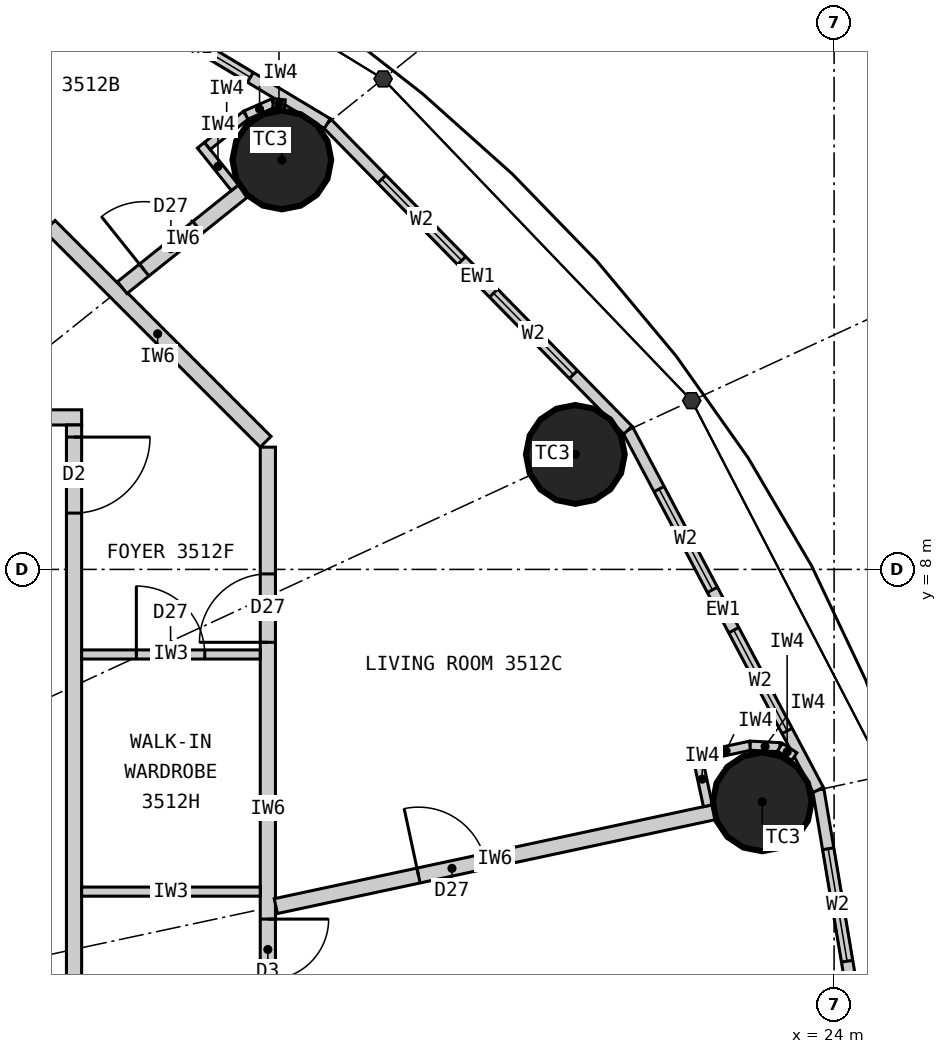
"""IFC4 building model, lengths in metres.
Left out: names, types, materials, properties, quantities, classifications, styles, units other than length and angle.
Written with IfcOpenShell. Run it as: python <this file> out.ifc"""

import sys

from ifc_helpers import new_model, si_unit, direction, frame, frame_2d, origin, origin_2d, place, context, subcontext, project, spatial, rectangle, circle, extrude, clip, halfspace, element, fill, save


model = new_model("IFC4")
c1 = context("Model", 3, precision=1e-05, world=origin(), true_north=direction((0.0, 1.0)))
c2 = subcontext(c1, "Body", "Model", "MODEL_VIEW")
j1 = project(units=[si_unit("LENGTHUNIT", "METRE"), si_unit("PLANEANGLEUNIT", "RADIAN")], contexts=[c1])
p1 = place(None, origin())
s1 = spatial("IfcSite", under=j1, at=p1, CompositionType="ELEMENT")
p2 = place(p1, origin())
s2 = spatial("IfcBuilding", under=s1, at=p2, CompositionType="ELEMENT")
p3 = place(p2, frame((0.0, 0.0, 135.3)))
s3 = spatial("IfcBuildingStorey", under=s2, at=p3, CompositionType="ELEMENT", Elevation=135.3)
for number, where, z_axis, x_axis in (
    (1, (23.055, 4.942, 0.0), (0.0, 0.0, 1.0), (1.0, 0.0, 0.0)),
    (2, (20.596, 9.513, 0.0), (0.0, 0.0, 1.0), (1.0, 0.0, 0.0)),
    (3, (16.734, 13.387, 0.0), (0.0, 0.0, 1.0), (1.0, 0.0, 0.0)),
):
    element("IfcColumn", number, at=place(p3, frame(where, z_axis=z_axis, x_axis=x_axis)), inside=s3, PredefinedType="COLUMN", context=c2, shape_type="Clipping", body=[
        clip(extrude(circle(Radius=0.65, at=origin_2d()), origin(), (0.0, 0.0, 1.0), 3.3), halfspace(frame((0.0, 0.0, 2.25), z_axis=(0.0, 0.0, 1.0), x_axis=(1.0, 0.0, 0.0)), False)),
    ])
p4 = place(p3, frame((24.65, 0.0, 0.0), z_axis=(0.0, 0.0, 1.0), x_axis=(-0.165883894218, 0.986145290329, 0.0)))
e4 = element("IfcWall", 4, at=p4, inside=s3, PredefinedType="ELEMENTEDWALL", context=c2, shape_type="SweptSolid", body=[
    extrude(rectangle(XDim=5.172, YDim=0.15, at=frame_2d((2.586, 0.0))), origin(), (0.0, 0.0, 1.0), 3.05),
])
p5 = place(p4, frame((0.786, 0.0, 0.9)))
e5 = element("IfcOpeningElement", 5, at=p5, cuts=e4, PredefinedType="OPENING", context=c2, shape_type="SweptSolid", body=[
    extrude(rectangle(XDim=1.5, YDim=1.9, at=frame_2d((0.75, 0.95))), frame((0.0, 0.085, 0.0), z_axis=(0.0, -1.0, 0.0), x_axis=(1.0, 0.0, 0.0)), (0.0, 0.0, 1.0), 0.17),
])
p6 = place(p4, frame((2.886, 0.0, 0.9)))
e6 = element("IfcOpeningElement", 6, at=p6, cuts=e4, PredefinedType="OPENING", context=c2, shape_type="SweptSolid", body=[
    extrude(rectangle(XDim=1.5, YDim=1.9, at=frame_2d((0.75, 0.95))), frame((0.0, 0.085, 0.0), z_axis=(0.0, -1.0, 0.0), x_axis=(1.0, 0.0, 0.0)), (0.0, 0.0, 1.0), 0.17),
])
p7 = place(p3, frame((23.792, 5.1, 0.0), z_axis=(0.0, 0.0, 1.0), x_axis=(-0.467814388454, 0.883826735257, 0.0)))
e7 = element("IfcWall", 7, at=p7, inside=s3, PredefinedType="ELEMENTEDWALL", context=c2, shape_type="SweptSolid", body=[
    extrude(rectangle(XDim=5.354, YDim=0.15, at=frame_2d((2.677, 0.0))), origin(), (0.0, 0.0, 1.0), 3.05),
])
p8 = place(p7, frame((0.877, 0.0, 0.9)))
e8 = element("IfcOpeningElement", 8, at=p8, cuts=e7, PredefinedType="OPENING", context=c2, shape_type="SweptSolid", body=[
    extrude(rectangle(XDim=1.5, YDim=1.9, at=frame_2d((0.75, 0.95))), frame((0.0, 0.085, 0.0), z_axis=(0.0, -1.0, 0.0), x_axis=(1.0, 0.0, 0.0)), (0.0, 0.0, 1.0), 0.17),
])
p9 = place(p7, frame((2.977, 0.0, 0.9)))
e9 = element("IfcOpeningElement", 9, at=p9, cuts=e7, PredefinedType="OPENING", context=c2, shape_type="SweptSolid", body=[
    extrude(rectangle(XDim=1.5, YDim=1.9, at=frame_2d((0.75, 0.95))), frame((0.0, 0.085, 0.0), z_axis=(0.0, -1.0, 0.0), x_axis=(1.0, 0.0, 0.0)), (0.0, 0.0, 1.0), 0.17),
])
p10 = place(p3, frame((21.287, 9.832, 0.0), z_axis=(0.0, 0.0, 1.0), x_axis=(-0.700136650834, 0.714008872605, 0.0)))
e10 = element("IfcWall", 10, at=p10, inside=s3, PredefinedType="ELEMENTEDWALL", context=c2, shape_type="SweptSolid", body=[
    extrude(rectangle(XDim=5.649, YDim=0.15, at=frame_2d((2.825, 0.0))), origin(), (0.0, 0.0, 1.0), 3.05),
])
p11 = place(p10, frame((1.025, 0.0, 0.9)))
e11 = element("IfcOpeningElement", 11, at=p11, cuts=e10, PredefinedType="OPENING", context=c2, shape_type="SweptSolid", body=[
    extrude(rectangle(XDim=1.5, YDim=1.9, at=frame_2d((0.75, 0.95))), frame((0.0, 0.085, 0.0), z_axis=(0.0, -1.0, 0.0), x_axis=(1.0, 0.0, 0.0)), (0.0, 0.0, 1.0), 0.17),
])
p12 = place(p10, frame((3.125, 0.0, 0.9)))
e12 = element("IfcOpeningElement", 12, at=p12, cuts=e10, PredefinedType="OPENING", context=c2, shape_type="SweptSolid", body=[
    extrude(rectangle(XDim=1.5, YDim=1.9, at=frame_2d((0.75, 0.95))), frame((0.0, 0.085, 0.0), z_axis=(0.0, -1.0, 0.0), x_axis=(1.0, 0.0, 0.0)), (0.0, 0.0, 1.0), 0.17),
])
p13 = place(p3, frame((17.332, 13.866, 0.0), z_axis=(0.0, 0.0, 1.0), x_axis=(-0.857308573723, 0.514802884044, 0.0)))
e13 = element("IfcWall", 13, at=p13, inside=s3, PredefinedType="ELEMENTEDWALL", context=c2, shape_type="SweptSolid", body=[
    extrude(rectangle(XDim=5.961, YDim=0.15, at=frame_2d((2.98, 0.0))), origin(), (0.0, 0.0, 1.0), 3.05),
])
p14 = place(p13, frame((1.181, 0.0, 0.9)))
e14 = element("IfcOpeningElement", 14, at=p14, cuts=e13, PredefinedType="OPENING", context=c2, shape_type="SweptSolid", body=[
    extrude(rectangle(XDim=1.5, YDim=1.9, at=frame_2d((0.75, 0.95))), frame((0.0, 0.085, 0.0), z_axis=(0.0, -1.0, 0.0), x_axis=(1.0, 0.0, 0.0)), (0.0, 0.0, 1.0), 0.17),
])
p15 = place(p13, frame((3.281, 0.0, 0.9)))
e15 = element("IfcOpeningElement", 15, at=p15, cuts=e13, PredefinedType="OPENING", context=c2, shape_type="SweptSolid", body=[
    extrude(rectangle(XDim=1.5, YDim=1.9, at=frame_2d((0.75, 0.95))), frame((0.0, 0.085, 0.0), z_axis=(0.0, -1.0, 0.0), x_axis=(1.0, 0.0, 0.0)), (0.0, 0.0, 1.0), 0.17),
])
p16 = place(p3, frame((-14.1, 10.0, 0.0), z_axis=(0.0, 0.0, 1.0), x_axis=(1.0, 0.0, 0.0)))
e16 = element("IfcWall", 16, at=p16, inside=s3, PredefinedType="PARTITIONING", context=c2, shape_type="SweptSolid", body=[
    extrude(rectangle(XDim=28.2, YDim=0.2, at=frame_2d((14.1, 0.0))), origin(), (0.0, 0.0, 1.0), 3.05),
])
p17 = place(p16, frame((12.884, 0.0, 0.0)))
e17 = element("IfcOpeningElement", 17, at=p17, cuts=e16, PredefinedType="OPENING", context=c2, shape_type="SweptSolid", body=[
    extrude(rectangle(XDim=1.0, YDim=2.2, at=frame_2d((0.5, 1.1))), frame((0.0, 0.11, 0.0), z_axis=(0.0, -1.0, 0.0), x_axis=(1.0, 0.0, 0.0)), (0.0, 0.0, 1.0), 0.22),
])
p18 = place(p16, frame((8.164, 0.0, 0.0)))
e18 = element("IfcOpeningElement", 18, at=p18, cuts=e16, PredefinedType="OPENING", context=c2, shape_type="SweptSolid", body=[
    extrude(rectangle(XDim=1.0, YDim=2.1, at=frame_2d((0.5, 1.05))), frame((0.0, 0.11, 0.0), z_axis=(0.0, -1.0, 0.0), x_axis=(1.0, 0.0, 0.0)), (0.0, 0.0, 1.0), 0.22),
])
p19 = place(p16, frame((3.591, 0.0, 0.0)))
e19 = element("IfcOpeningElement", 19, at=p19, cuts=e16, PredefinedType="OPENING", context=c2, shape_type="SweptSolid", body=[
    extrude(rectangle(XDim=1.0, YDim=2.2, at=frame_2d((0.5, 1.1))), frame((0.0, 0.11, 0.0), z_axis=(0.0, -1.0, 0.0), x_axis=(1.0, 0.0, 0.0)), (0.0, 0.0, 1.0), 0.22),
])
p20 = place(p16, frame((17.12, 0.0, 0.0)))
e20 = element("IfcOpeningElement", 20, at=p20, cuts=e16, PredefinedType="OPENING", context=c2, shape_type="SweptSolid", body=[
    extrude(rectangle(XDim=1.0, YDim=2.1, at=frame_2d((0.5, 1.05))), frame((0.0, 0.11, 0.0), z_axis=(0.0, -1.0, 0.0), x_axis=(1.0, 0.0, 0.0)), (0.0, 0.0, 1.0), 0.22),
])
p21 = place(p3, frame((14.0, -9.9, 0.0), z_axis=(0.0, 0.0, 1.0), x_axis=(0.0, 1.0, 0.0)))
e21 = element("IfcWall", 21, at=p21, inside=s3, PredefinedType="PARTITIONING", context=c2, shape_type="SweptSolid", body=[
    extrude(rectangle(XDim=19.8, YDim=0.2, at=frame_2d((9.9, 0.0))), origin(), (0.0, 0.0, 1.0), 3.05),
])
p22 = place(p21, frame((4.948, 0.0, 0.0)))
e22 = element("IfcOpeningElement", 22, at=p22, cuts=e21, PredefinedType="OPENING", context=c2, shape_type="SweptSolid", body=[
    extrude(rectangle(XDim=1.0, YDim=2.2, at=frame_2d((0.5, 1.1))), frame((0.0, 0.11, 0.0), z_axis=(0.0, -1.0, 0.0), x_axis=(1.0, 0.0, 0.0)), (0.0, 0.0, 1.0), 0.22),
])
p23 = place(p21, frame((18.641, 0.0, 0.0)))
e23 = element("IfcOpeningElement", 23, at=p23, cuts=e21, PredefinedType="OPENING", context=c2, shape_type="SweptSolid", body=[
    extrude(rectangle(XDim=1.0, YDim=2.2, at=frame_2d((0.5, 1.1))), frame((0.0, 0.11, 0.0), z_axis=(0.0, -1.0, 0.0), x_axis=(1.0, 0.0, 0.0)), (0.0, 0.0, 1.0), 0.22),
])
p24 = place(p3, frame((16.55, 0.101, 0.0), z_axis=(0.0, 0.0, 1.0), x_axis=(0.0, 1.0, 0.0)))
e24 = element("IfcWall", 24, at=p24, inside=s3, PredefinedType="PARTITIONING", context=c2, shape_type="SweptSolid", body=[
    extrude(rectangle(XDim=9.508, YDim=0.2, at=frame_2d((4.754, 0.0))), origin(), (0.0, 0.0, 1.0), 3.05),
])
p25 = place(p24, frame((2.499, 0.0, 0.0)))
e25 = element("IfcOpeningElement", 25, at=p25, cuts=e24, PredefinedType="OPENING", context=c2, shape_type="SweptSolid", body=[
    extrude(rectangle(XDim=0.8, YDim=2.1, at=frame_2d((0.4, 1.05))), frame((0.0, 0.11, 0.0), z_axis=(0.0, -1.0, 0.0), x_axis=(1.0, 0.0, 0.0)), (0.0, 0.0, 1.0), 0.22),
])
p26 = place(p24, frame((6.94, 0.0, 0.0)))
e26 = element("IfcOpeningElement", 26, at=p26, cuts=e24, PredefinedType="OPENING", context=c2, shape_type="SweptSolid", body=[
    extrude(rectangle(XDim=0.9, YDim=2.1, at=frame_2d((0.45, 1.05))), frame((0.0, 0.11, 0.0), z_axis=(0.0, -1.0, 0.0), x_axis=(1.0, 0.0, 0.0)), (0.0, 0.0, 1.0), 0.22),
])
p27 = place(p3, frame((16.521, 9.679, 0.0), z_axis=(0.0, 0.0, 1.0), x_axis=(-0.707106781187, 0.707106781187, 0.0)))
e27 = element("IfcWall", 27, at=p27, inside=s3, PredefinedType="PARTITIONING", context=c2, shape_type="SweptSolid", body=[
    extrude(rectangle(XDim=4.019, YDim=0.2, at=frame_2d((2.009, 0.0))), origin(), (0.0, 0.0, 1.0), 3.05),
])
p28 = place(p3, frame((16.655, 3.57, 0.0), z_axis=(0.0, 0.0, 1.0), x_axis=(0.977781197989, 0.209628072687, 0.0)))
e28 = element("IfcWall", 28, at=p28, inside=s3, PredefinedType="PARTITIONING", context=c2, shape_type="SweptSolid", body=[
    extrude(rectangle(XDim=5.896, YDim=0.2, at=frame_2d((2.948, 0.0))), origin(), (0.0, 0.0, 1.0), 2.15),
])
p29 = place(p28, frame((1.92, 0.0, 0.0)))
e29 = element("IfcOpeningElement", 29, at=p29, cuts=e28, PredefinedType="OPENING", context=c2, shape_type="SweptSolid", body=[
    extrude(rectangle(XDim=0.9, YDim=2.1, at=frame_2d((0.45, 1.05))), frame((0.0, 0.11, 0.0), z_axis=(0.0, -1.0, 0.0), x_axis=(1.0, 0.0, 0.0)), (0.0, 0.0, 1.0), 0.22),
])
p30 = place(p3, frame((14.634, 11.707, 0.0), z_axis=(0.0, 0.0, 1.0), x_axis=(0.780845447951, 0.6247242483, 0.0)))
e30 = element("IfcWall", 30, at=p30, inside=s3, PredefinedType="PARTITIONING", context=c2, shape_type="SweptSolid", body=[
    extrude(rectangle(XDim=2.039, YDim=0.2, at=frame_2d((1.02, 0.0))), origin(), (0.0, 0.0, 1.0), 2.15),
])
p31 = place(p30, frame((0.37, 0.0, 0.0)))
e31 = element("IfcOpeningElement", 31, at=p31, cuts=e30, PredefinedType="OPENING", context=c2, shape_type="SweptSolid", body=[
    extrude(rectangle(XDim=0.9, YDim=2.1, at=frame_2d((0.45, 1.05))), frame((0.0, 0.11, 0.0), z_axis=(0.0, -1.0, 0.0), x_axis=(1.0, 0.0, 0.0)), (0.0, 0.0, 1.0), 0.22),
])
p32 = place(p3, frame((14.1, 3.761, 0.0), z_axis=(0.0, 0.0, 1.0), x_axis=(1.0, 0.0, 0.0)))
e32 = element("IfcWall", 32, at=p32, inside=s3, PredefinedType="PARTITIONING", context=c2, shape_type="SweptSolid", body=[
    extrude(rectangle(XDim=2.35, YDim=0.12, at=frame_2d((1.175, 0.0))), origin(), (0.0, 0.0, 1.0), 2.15),
])
p33 = place(p3, frame((14.1, 6.881, 0.0), z_axis=(0.0, 0.0, 1.0), x_axis=(1.0, 0.0, 0.0)))
e33 = element("IfcWall", 33, at=p33, inside=s3, PredefinedType="PARTITIONING", context=c2, shape_type="SweptSolid", body=[
    extrude(rectangle(XDim=2.35, YDim=0.12, at=frame_2d((1.175, 0.0))), origin(), (0.0, 0.0, 1.0), 3.05),
])
p34 = place(p33, frame((0.72, 0.0, 0.0)))
e34 = element("IfcOpeningElement", 34, at=p34, cuts=e33, PredefinedType="OPENING", context=c2, shape_type="SweptSolid", body=[
    extrude(rectangle(XDim=0.9, YDim=2.1, at=frame_2d((0.45, 1.05))), frame((0.0, 0.07, 0.0), z_axis=(0.0, -1.0, 0.0), x_axis=(1.0, 0.0, 0.0)), (0.0, 0.0, 1.0), 0.14),
])
p35 = place(p3, frame((22.34, 4.891, 0.0), z_axis=(0.0, 0.0, 1.0), x_axis=(-0.20948248875, 0.977812398626, 0.0)))
e35 = element("IfcWall", 35, at=p35, inside=s3, PredefinedType="PARTITIONING", context=c2, shape_type="SweptSolid", body=[
    extrude(rectangle(XDim=0.716, YDim=0.12, at=frame_2d((0.358, 0.0))), origin(), (0.0, 0.0, 1.0), 3.05),
])
p36 = place(p3, frame((22.261, 5.545, 0.0), z_axis=(0.0, 0.0, 1.0), x_axis=(0.977785919621, 0.209606048079, 0.0)))
e36 = element("IfcWall", 36, at=p36, inside=s3, PredefinedType="PARTITIONING", context=c2, shape_type="SweptSolid", body=[
    extrude(rectangle(XDim=0.65, YDim=0.12, at=frame_2d((0.325, 0.0))), origin(), (0.0, 0.0, 1.0), 3.05),
])
p37 = place(p3, frame((22.896, 5.681, 0.0), z_axis=(0.0, 0.0, 1.0), x_axis=(0.998721012592, -0.050560251262, 0.0)))
e37 = element("IfcWall", 37, at=p37, inside=s3, PredefinedType="PARTITIONING", context=c2, shape_type="SweptSolid", body=[
    extrude(rectangle(XDim=0.391, YDim=0.12, at=frame_2d((0.196, 0.0))), origin(), (0.0, 0.0, 1.0), 3.05),
])
p38 = place(p3, frame((23.287, 5.661, 0.0), z_axis=(0.0, 0.0, 1.0), x_axis=(0.839916668497, -0.542715385798, 0.0)))
e38 = element("IfcWall", 38, at=p38, inside=s3, PredefinedType="PARTITIONING", context=c2, shape_type="SweptSolid", body=[
    extrude(rectangle(XDim=0.227, YDim=0.12, at=frame_2d((0.113, 0.0))), origin(), (0.0, 0.0, 1.0), 3.05),
])
p39 = place(p3, frame((16.117, 13.022, 0.0), z_axis=(0.0, 0.0, 1.0), x_axis=(-0.62465344249, 0.780902091677, 0.0)))
e39 = element("IfcWall", 39, at=p39, inside=s3, PredefinedType="PARTITIONING", context=c2, shape_type="SweptSolid", body=[
    extrude(rectangle(XDim=0.716, YDim=0.12, at=frame_2d((0.358, 0.0))), origin(), (0.0, 0.0, 1.0), 3.05),
])
p40 = place(p3, frame((15.754, 13.571, 0.0), z_axis=(0.0, 0.0, 1.0), x_axis=(0.780905453553, 0.624649239663, 0.0)))
e40 = element("IfcWall", 40, at=p40, inside=s3, PredefinedType="PARTITIONING", context=c2, shape_type="SweptSolid", body=[
    extrude(rectangle(XDim=0.65, YDim=0.12, at=frame_2d((0.325, 0.0))), origin(), (0.0, 0.0, 1.0), 3.05),
])
p41 = place(p3, frame((16.262, 13.977, 0.0), z_axis=(0.0, 0.0, 1.0), x_axis=(0.915985403703, 0.401211590314, 0.0)))
e41 = element("IfcWall", 41, at=p41, inside=s3, PredefinedType="PARTITIONING", context=c2, shape_type="SweptSolid", body=[
    extrude(rectangle(XDim=0.391, YDim=0.12, at=frame_2d((0.196, 0.0))), origin(), (0.0, 0.0, 1.0), 3.05),
])
p42 = place(p3, frame((16.62, 14.134, 0.0), z_axis=(0.0, 0.0, 1.0), x_axis=(0.993941871493, -0.109907033867, 0.0)))
e42 = element("IfcWall", 42, at=p42, inside=s3, PredefinedType="PARTITIONING", context=c2, shape_type="SweptSolid", body=[
    extrude(rectangle(XDim=0.153, YDim=0.12, at=frame_2d((0.077, 0.0))), origin(), (0.0, 0.0, 1.0), 3.05),
])
p43 = place(p6, origin())
e43 = element("IfcWindow", 43, at=p43, inside=s3, PartitioningType="SINGLE_PANEL", PredefinedType="WINDOW", context=c2, shape_type="SweptSolid", body=[
    extrude(rectangle(XDim=1.5, YDim=1.9, at=frame_2d((0.75, 0.95))), frame((0.0, 0.03, 0.0), z_axis=(0.0, -1.0, 0.0), x_axis=(1.0, 0.0, 0.0)), (0.0, 0.0, 1.0), 0.06),
])
fill(e6, e43)
p44 = place(p8, origin())
e44 = element("IfcWindow", 44, at=p44, inside=s3, PartitioningType="SINGLE_PANEL", PredefinedType="WINDOW", context=c2, shape_type="SweptSolid", body=[
    extrude(rectangle(XDim=1.5, YDim=1.9, at=frame_2d((0.75, 0.95))), frame((0.0, 0.03, 0.0), z_axis=(0.0, -1.0, 0.0), x_axis=(1.0, 0.0, 0.0)), (0.0, 0.0, 1.0), 0.06),
])
fill(e8, e44)
p45 = place(p9, origin())
e45 = element("IfcWindow", 45, at=p45, inside=s3, PartitioningType="SINGLE_PANEL", PredefinedType="WINDOW", context=c2, shape_type="SweptSolid", body=[
    extrude(rectangle(XDim=1.5, YDim=1.9, at=frame_2d((0.75, 0.95))), frame((0.0, 0.03, 0.0), z_axis=(0.0, -1.0, 0.0), x_axis=(1.0, 0.0, 0.0)), (0.0, 0.0, 1.0), 0.06),
])
fill(e9, e45)
p46 = place(p11, origin())
e46 = element("IfcWindow", 46, at=p46, inside=s3, PartitioningType="SINGLE_PANEL", PredefinedType="WINDOW", context=c2, shape_type="SweptSolid", body=[
    extrude(rectangle(XDim=1.5, YDim=1.9, at=frame_2d((0.75, 0.95))), frame((0.0, 0.03, 0.0), z_axis=(0.0, -1.0, 0.0), x_axis=(1.0, 0.0, 0.0)), (0.0, 0.0, 1.0), 0.06),
])
fill(e11, e46)
p47 = place(p12, origin())
e47 = element("IfcWindow", 47, at=p47, inside=s3, PartitioningType="SINGLE_PANEL", PredefinedType="WINDOW", context=c2, shape_type="SweptSolid", body=[
    extrude(rectangle(XDim=1.5, YDim=1.9, at=frame_2d((0.75, 0.95))), frame((0.0, 0.03, 0.0), z_axis=(0.0, -1.0, 0.0), x_axis=(1.0, 0.0, 0.0)), (0.0, 0.0, 1.0), 0.06),
])
fill(e12, e47)
p48 = place(p14, origin())
e48 = element("IfcWindow", 48, at=p48, inside=s3, PartitioningType="SINGLE_PANEL", PredefinedType="WINDOW", context=c2, shape_type="SweptSolid", body=[
    extrude(rectangle(XDim=1.5, YDim=1.9, at=frame_2d((0.75, 0.95))), frame((0.0, 0.03, 0.0), z_axis=(0.0, -1.0, 0.0), x_axis=(1.0, 0.0, 0.0)), (0.0, 0.0, 1.0), 0.06),
])
fill(e14, e48)
p49 = place(p23, origin())
e49 = element("IfcDoor", 49, at=p49, inside=s3, OperationType="SINGLE_SWING_RIGHT", PredefinedType="DOOR", context=c2, shape_type="SweptSolid", body=[
    extrude(rectangle(XDim=1.0, YDim=2.2, at=frame_2d((0.5, 1.1))), frame((0.0, 0.025, 0.0), z_axis=(0.0, -1.0, 0.0), x_axis=(1.0, 0.0, 0.0)), (0.0, 0.0, 1.0), 0.05),
])
fill(e23, e49)
p50 = place(p25, origin())
e50 = element("IfcDoor", 50, at=p50, inside=s3, OperationType="SINGLE_SWING_RIGHT", PredefinedType="DOOR", context=c2, shape_type="SweptSolid", body=[
    extrude(rectangle(XDim=0.8, YDim=2.1, at=frame_2d((0.4, 1.05))), frame((0.0, 0.025, 0.0), z_axis=(0.0, -1.0, 0.0), x_axis=(1.0, 0.0, 0.0)), (0.0, 0.0, 1.0), 0.05),
])
fill(e25, e50)
p51 = place(p34, origin())
e51 = element("IfcDoor", 51, at=p51, inside=s3, OperationType="SINGLE_SWING_LEFT", PredefinedType="DOOR", context=c2, shape_type="SweptSolid", body=[
    extrude(rectangle(XDim=0.9, YDim=2.1, at=frame_2d((0.45, 1.05))), frame((0.0, 0.025, 0.0), z_axis=(0.0, -1.0, 0.0), x_axis=(1.0, 0.0, 0.0)), (0.0, 0.0, 1.0), 0.05),
])
fill(e34, e51)
p52 = place(p26, origin())
e52 = element("IfcDoor", 52, at=p52, inside=s3, OperationType="SINGLE_SWING_LEFT", PredefinedType="DOOR", context=c2, shape_type="SweptSolid", body=[
    extrude(rectangle(XDim=0.9, YDim=2.1, at=frame_2d((0.45, 1.05))), frame((0.0, 0.025, 0.0), z_axis=(0.0, -1.0, 0.0), x_axis=(1.0, 0.0, 0.0)), (0.0, 0.0, 1.0), 0.05),
])
fill(e26, e52)
p53 = place(p29, origin())
e53 = element("IfcDoor", 53, at=p53, inside=s3, OperationType="SINGLE_SWING_LEFT", PredefinedType="DOOR", context=c2, shape_type="SweptSolid", body=[
    extrude(rectangle(XDim=0.9, YDim=2.1, at=frame_2d((0.45, 1.05))), frame((0.0, 0.025, 0.0), z_axis=(0.0, -1.0, 0.0), x_axis=(1.0, 0.0, 0.0)), (0.0, 0.0, 1.0), 0.05),
])
fill(e29, e53)
p54 = place(p31, origin())
e54 = element("IfcDoor", 54, at=p54, inside=s3, OperationType="SINGLE_SWING_LEFT", PredefinedType="DOOR", context=c2, shape_type="SweptSolid", body=[
    extrude(rectangle(XDim=0.9, YDim=2.1, at=frame_2d((0.45, 1.05))), frame((0.0, 0.025, 0.0), z_axis=(0.0, -1.0, 0.0), x_axis=(1.0, 0.0, 0.0)), (0.0, 0.0, 1.0), 0.05),
])
fill(e31, e54)
save(model, sys.argv[1])
